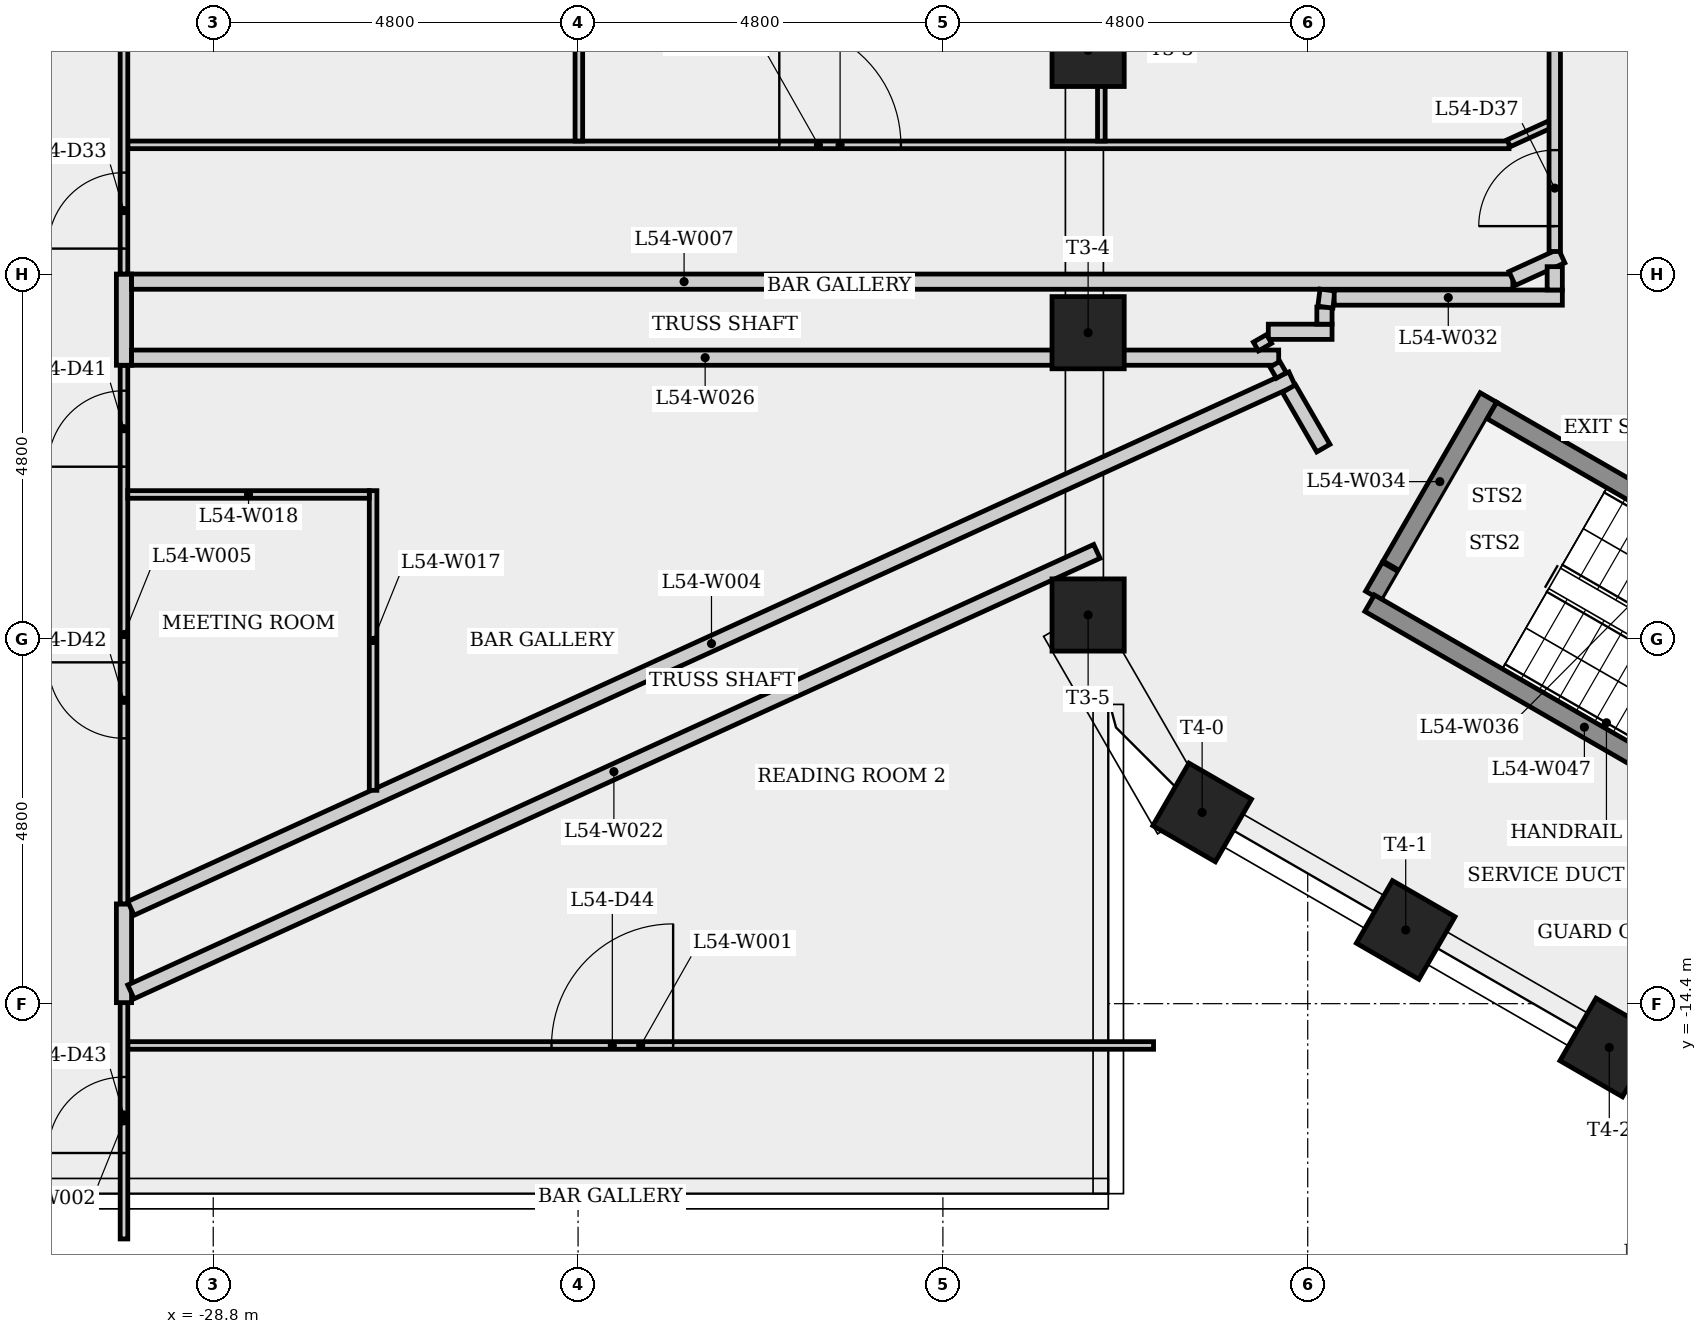
"""IFC4 building model, lengths in metres.
Left out: names, types, materials, properties, quantities, classifications, styles, units other than length and angle.
Written with IfcOpenShell. Run it as: python <this file> out.ifc"""

import sys

from ifc_helpers import new_model, si_unit, direction, frame, frame_2d, origin, origin_2d, place, context, subcontext, project, spatial, rectangle, extrude, element, fill, save


model = new_model("IFC4")
c1 = context("Model", 3, precision=1e-05, world=origin(), true_north=direction((0.0, 1.0)))
c2 = subcontext(c1, "Body", "Model", "MODEL_VIEW")
j1 = project(units=[si_unit("LENGTHUNIT", "METRE"), si_unit("PLANEANGLEUNIT", "RADIAN")], contexts=[c1])
p1 = place(None, origin())
s1 = spatial("IfcSite", under=j1, at=p1, CompositionType="ELEMENT")
p2 = place(p1, origin())
s2 = spatial("IfcBuilding", under=s1, at=p2, CompositionType="ELEMENT")
p3 = place(p2, frame((0.0, 0.0, 202.1)))
s3 = spatial("IfcBuildingStorey", under=s2, at=p3, CompositionType="ELEMENT", Elevation=202.1)
for number, where, z_axis, x_axis in (
    (1, (-17.289, -1.857, 0.0), (0.0, 0.0, 1.0), (-1.0, 0.0, 0.0)),
    (2, (-17.289, -5.572, 0.0), (0.0, 0.0, 1.0), (-1.0, 0.0, 0.0)),
    (3, (-17.289, -9.286, 0.0), (0.0, 0.0, 1.0), (-1.0, 0.0, 0.0)),
    (4, (-15.789, -11.884, 0.0), (0.0, 0.0, 1.0), (-0.5, -0.866, 0.0)),
    (5, (-13.111, -13.43, 0.0), (0.0, 0.0, 1.0), (-0.5, -0.866, 0.0)),
    (6, (-10.432, -14.977, 0.0), (0.0, 0.0, 1.0), (-0.5, -0.866, 0.0)),
):
    element("IfcColumn", number, at=place(p3, frame(where, z_axis=z_axis, x_axis=x_axis)), inside=s3, PredefinedType="COLUMN", context=c2, shape_type="SweptSolid", body=[
        extrude(rectangle(XDim=0.95, YDim=0.95, at=origin_2d()), origin(), (0.0, 0.0, 1.0), 4.0),
    ])
p4 = place(p3, frame((-29.924, -14.95, 0.0), z_axis=(0.0, 0.0, 1.0), x_axis=(1.0, 0.0, 0.0)))
e7 = element("IfcWall", 7, at=p4, inside=s3, PredefinedType="PARTITIONING", context=c2, shape_type="SweptSolid", body=[
    extrude(rectangle(XDim=13.496, YDim=0.1, at=frame_2d((6.748, 0.0))), origin(), (0.0, 0.0, 1.0), 3.6),
])
p5 = place(p4, frame((5.575, 0.0, 0.0)))
e8 = element("IfcOpeningElement", 8, at=p5, cuts=e7, PredefinedType="OPENING", context=c2, shape_type="SweptSolid", body=[
    extrude(rectangle(XDim=1.6, YDim=2.1, at=frame_2d((0.8, 1.05))), frame((0.0, 0.06, 0.0), z_axis=(0.0, -1.0, 0.0), x_axis=(1.0, 0.0, 0.0)), (0.0, 0.0, 1.0), 0.12),
])
p6 = place(p3, frame((-29.974, -17.496, 0.0), z_axis=(0.0, 0.0, 1.0), x_axis=(0.0, 1.0, 0.0)))
e9 = element("IfcWall", 9, at=p6, inside=s3, PredefinedType="PARTITIONING", context=c2, shape_type="SweptSolid", body=[
    extrude(rectangle(XDim=3.11, YDim=0.1, at=frame_2d((1.555, 0.0))), origin(), (0.0, 0.0, 1.0), 3.6),
])
p7 = place(p6, frame((1.131, 0.0, 0.0)))
e10 = element("IfcOpeningElement", 10, at=p7, cuts=e9, PredefinedType="OPENING", context=c2, shape_type="SweptSolid", body=[
    extrude(rectangle(XDim=1.0, YDim=2.1, at=frame_2d((0.5, 1.05))), frame((0.0, 0.06, 0.0), z_axis=(0.0, -1.0, 0.0), x_axis=(1.0, 0.0, 0.0)), (0.0, 0.0, 1.0), 0.12),
])
p8 = place(p3, frame((-29.974, -14.387, 0.0), z_axis=(0.0, 0.0, 1.0), x_axis=(0.0, 1.0, 0.0)))
e11 = element("IfcWall", 11, at=p8, inside=s3, PredefinedType="PLUMBINGWALL", context=c2, shape_type="SweptSolid", body=[
    extrude(rectangle(XDim=1.299, YDim=0.2, at=frame_2d((0.649, 0.0))), origin(), (0.0, 0.0, 1.0), 3.6),
])
p9 = place(p3, frame((-29.883, -13.146, 0.0), z_axis=(0.0, 0.0, 1.0), x_axis=(0.909854392912, 0.414927684903, 0.0)))
e12 = element("IfcWall", 12, at=p9, inside=s3, PredefinedType="PLUMBINGWALL", context=c2, shape_type="SweptSolid", body=[
    extrude(rectangle(XDim=16.791, YDim=0.2, at=frame_2d((8.396, 0.0))), origin(), (0.0, 0.0, 1.0), 3.6),
])
p10 = place(p3, frame((-29.974, -13.088, 0.0), z_axis=(0.0, 0.0, 1.0), x_axis=(0.0, 1.0, 0.0)))
e13 = element("IfcWall", 13, at=p10, inside=s3, PredefinedType="PARTITIONING", context=c2, shape_type="SweptSolid", body=[
    extrude(rectangle(XDim=7.088, YDim=0.1, at=frame_2d((3.544, 0.0))), origin(), (0.0, 0.0, 1.0), 3.6),
])
p11 = place(p10, frame((5.753, 0.0, 0.0)))
e14 = element("IfcOpeningElement", 14, at=p11, cuts=e13, PredefinedType="OPENING", context=c2, shape_type="SweptSolid", body=[
    extrude(rectangle(XDim=1.0, YDim=2.1, at=frame_2d((0.5, 1.05))), frame((0.0, 0.06, 0.0), z_axis=(0.0, -1.0, 0.0), x_axis=(1.0, 0.0, 0.0)), (0.0, 0.0, 1.0), 0.12),
])
p12 = place(p10, frame((2.179, 0.0, 0.0)))
e15 = element("IfcOpeningElement", 15, at=p12, cuts=e13, PredefinedType="OPENING", context=c2, shape_type="SweptSolid", body=[
    extrude(rectangle(XDim=1.0, YDim=2.1, at=frame_2d((0.5, 1.05))), frame((0.0, 0.06, 0.0), z_axis=(0.0, -1.0, 0.0), x_axis=(1.0, 0.0, 0.0)), (0.0, 0.0, 1.0), 0.12),
])
p13 = place(p3, frame((-29.974, -6.0, 0.0), z_axis=(0.0, 0.0, 1.0), x_axis=(0.0, 1.0, 0.0)))
e16 = element("IfcWall", 16, at=p13, inside=s3, PredefinedType="PLUMBINGWALL", context=c2, shape_type="SweptSolid", body=[
    extrude(rectangle(XDim=1.2, YDim=0.2, at=frame_2d((0.6, 0.0))), origin(), (0.0, 0.0, 1.0), 3.6),
])
p14 = place(p3, frame((-29.874, -4.9, 0.0), z_axis=(0.0, 0.0, 1.0), x_axis=(1.0, 0.0, 0.0)))
e17 = element("IfcWall", 17, at=p14, inside=s3, PredefinedType="PLUMBINGWALL", context=c2, shape_type="SweptSolid", body=[
    extrude(rectangle(XDim=18.173, YDim=0.2, at=frame_2d((9.086, 0.0))), origin(), (0.0, 0.0, 1.0), 3.6),
])
p15 = place(p3, frame((-29.924, -3.1, 0.0), z_axis=(0.0, 0.0, 1.0), x_axis=(1.0, 0.0, 0.0)))
e18 = element("IfcWall", 18, at=p15, inside=s3, PredefinedType="PARTITIONING", context=c2, shape_type="SweptSolid", body=[
    extrude(rectangle(XDim=18.173, YDim=0.1, at=frame_2d((9.086, 0.0))), origin(), (0.0, 0.0, 1.0), 3.6),
])
p16 = place(p15, frame((8.572, 0.0, 0.0)))
e19 = element("IfcOpeningElement", 19, at=p16, cuts=e18, PredefinedType="OPENING", context=c2, shape_type="SweptSolid", body=[
    extrude(rectangle(XDim=1.6, YDim=2.1, at=frame_2d((0.8, 1.05))), frame((0.0, 0.06, 0.0), z_axis=(0.0, -1.0, 0.0), x_axis=(1.0, 0.0, 0.0)), (0.0, 0.0, 1.0), 0.12),
])
p17 = place(p3, frame((-29.974, -4.8, 0.0), z_axis=(0.0, 0.0, 1.0), x_axis=(0.0, 1.0, 0.0)))
e20 = element("IfcWall", 20, at=p17, inside=s3, PredefinedType="PARTITIONING", context=c2, shape_type="SweptSolid", body=[
    extrude(rectangle(XDim=13.8, YDim=0.1, at=frame_2d((6.9, 0.0))), origin(), (0.0, 0.0, 1.0), 3.6),
])
p18 = place(p17, frame((0.335, 0.0, 0.0)))
e21 = element("IfcOpeningElement", 21, at=p18, cuts=e20, PredefinedType="OPENING", context=c2, shape_type="SweptSolid", body=[
    extrude(rectangle(XDim=1.0, YDim=2.1, at=frame_2d((0.5, 1.05))), frame((0.0, 0.06, 0.0), z_axis=(0.0, -1.0, 0.0), x_axis=(1.0, 0.0, 0.0)), (0.0, 0.0, 1.0), 0.12),
])
p19 = place(p17, frame((6.965, 0.0, 0.0)))
e22 = element("IfcOpeningElement", 22, at=p19, cuts=e20, PredefinedType="OPENING", context=c2, shape_type="SweptSolid", body=[
    extrude(rectangle(XDim=1.6, YDim=2.1, at=frame_2d((0.8, 1.05))), frame((0.0, 0.06, 0.0), z_axis=(0.0, -1.0, 0.0), x_axis=(1.0, 0.0, 0.0)), (0.0, 0.0, 1.0), 0.12),
])
p20 = place(p3, frame((-26.697, -11.593, 0.0), z_axis=(0.0, 0.0, 1.0), x_axis=(0.0, 1.0, 0.0)))
e23 = element("IfcWall", 23, at=p20, inside=s3, PredefinedType="PARTITIONING", context=c2, shape_type="SweptSolid", body=[
    extrude(rectangle(XDim=3.943, YDim=0.1, at=frame_2d((1.972, 0.0))), origin(), (0.0, 0.0, 1.0), 3.6),
])
p21 = place(p3, frame((-26.747, -7.7, 0.0), z_axis=(0.0, 0.0, 1.0), x_axis=(-1.0, 0.0, 0.0)))
e24 = element("IfcWall", 24, at=p21, inside=s3, PredefinedType="PARTITIONING", context=c2, shape_type="SweptSolid", body=[
    extrude(rectangle(XDim=3.177, YDim=0.1, at=frame_2d((1.589, 0.0))), origin(), (0.0, 0.0, 1.0), 3.6),
])
p22 = place(p3, frame((-23.99, -3.05, 0.0), z_axis=(0.0, 0.0, 1.0), x_axis=(0.0, 1.0, 0.0)))
e25 = element("IfcWall", 25, at=p22, inside=s3, PredefinedType="PARTITIONING", context=c2, shape_type="SweptSolid", body=[
    extrude(rectangle(XDim=12.05, YDim=0.1, at=frame_2d((6.025, 0.0))), origin(), (0.0, 0.0, 1.0), 3.6),
])
p23 = place(p3, frame((-17.174, -8.449, 0.0), z_axis=(0.0, 0.0, 1.0), x_axis=(-0.909851000848, -0.414935122947, 0.0)))
e26 = element("IfcWall", 26, at=p23, inside=s3, PredefinedType="PLUMBINGWALL", context=c2, shape_type="SweptSolid", body=[
    extrude(rectangle(XDim=13.968, YDim=0.2, at=frame_2d((6.984, 0.0))), origin(), (0.0, 0.0, 1.0), 3.6),
])
p24 = place(p3, frame((-17.115, -3.05, 0.0), z_axis=(0.0, 0.0, 1.0), x_axis=(0.0, 1.0, 0.0)))
e27 = element("IfcWall", 27, at=p24, inside=s3, PredefinedType="PARTITIONING", context=c2, shape_type="SweptSolid", body=[
    extrude(rectangle(XDim=12.05, YDim=0.1, at=frame_2d((6.025, 0.0))), origin(), (0.0, 0.0, 1.0), 2.775),
])
p25 = place(p3, frame((-14.918, -5.56, 0.0), z_axis=(0.0, 0.0, 1.0), x_axis=(1.0, 0.0, 0.0)))
e28 = element("IfcWall", 28, at=p25, inside=s3, PredefinedType="PLUMBINGWALL", context=c2, shape_type="SweptSolid", body=[
    extrude(rectangle(XDim=0.838, YDim=0.2, at=frame_2d((0.419, 0.0))), origin(), (0.0, 0.0, 1.0), 3.6),
])
p26 = place(p3, frame((-14.782, -5.9, 0.0), z_axis=(0.0, 0.0, 1.0), x_axis=(-1.0, 0.0, 0.0)))
e29 = element("IfcWall", 29, at=p26, inside=s3, PredefinedType="PLUMBINGWALL", context=c2, shape_type="SweptSolid", body=[
    extrude(rectangle(XDim=15.092, YDim=0.2, at=frame_2d((7.546, 0.0))), origin(), (0.0, 0.0, 1.0), 3.6),
])
p27 = place(p3, frame((-14.962, -5.761, 0.0), z_axis=(0.0, 0.0, 1.0), x_axis=(-0.499880961361, 0.866094119867, 0.0)))
e30 = element("IfcWall", 30, at=p27, inside=s3, PredefinedType="PLUMBINGWALL", context=c2, shape_type="SweptSolid", body=[
    extrude(rectangle(XDim=0.133, YDim=0.2, at=frame_2d((0.067, 0.0))), origin(), (0.0, 0.0, 1.0), 3.6),
])
p28 = place(p3, frame((-14.747, -6.134, 0.0), z_axis=(0.0, 0.0, 1.0), x_axis=(-0.499846793097, 0.866113839764, 0.0)))
e31 = element("IfcWall", 31, at=p28, inside=s3, PredefinedType="PARTITIONING", context=c2, shape_type="SweptSolid", body=[
    extrude(rectangle(XDim=0.17, YDim=0.15, at=frame_2d((0.085, 0.0))), origin(), (0.0, 0.0, 1.0), 3.6),
])
p29 = place(p3, frame((-14.195, -7.091, 0.0), z_axis=(0.0, 0.0, 1.0), x_axis=(-0.499940434119, 0.866059791431, 0.0)))
e32 = element("IfcWall", 32, at=p29, inside=s3, PredefinedType="PLUMBINGWALL", context=c2, shape_type="SweptSolid", body=[
    extrude(rectangle(XDim=0.905, YDim=0.2, at=frame_2d((0.452, 0.0))), origin(), (0.0, 0.0, 1.0), 3.6),
])
p30 = place(p3, frame((-14.18, -5.459, 0.0), z_axis=(0.0, 0.0, 1.0), x_axis=(0.0, 1.0, 0.0)))
e33 = element("IfcWall", 33, at=p30, inside=s3, PredefinedType="PLUMBINGWALL", context=c2, shape_type="SweptSolid", body=[
    extrude(rectangle(XDim=0.225, YDim=0.2, at=frame_2d((0.113, 0.0))), origin(), (0.0, 0.0, 1.0), 3.6),
])
p31 = place(p3, frame((-14.167, -5.235, 0.0), z_axis=(0.0, 0.0, 1.0), x_axis=(0.124962785906, 0.992161429475, 0.0)))
e34 = element("IfcWall", 34, at=p31, inside=s3, PredefinedType="PLUMBINGWALL", context=c2, shape_type="SweptSolid", body=[
    extrude(rectangle(XDim=0.227, YDim=0.2, at=frame_2d((0.113, 0.0))), origin(), (0.0, 0.0, 1.0), 3.6),
])
p32 = place(p3, frame((-14.052, -5.11, 0.0), z_axis=(0.0, 0.0, 1.0), x_axis=(1.0, 0.0, 0.0)))
e35 = element("IfcWall", 35, at=p32, inside=s3, PredefinedType="PLUMBINGWALL", context=c2, shape_type="SweptSolid", body=[
    extrude(rectangle(XDim=3.002, YDim=0.2, at=frame_2d((1.501, 0.0))), origin(), (0.0, 0.0, 1.0), 3.6),
])
p33 = place(p3, frame((-13.531, -9.035, 0.0), z_axis=(0.0, 0.0, 1.0), x_axis=(0.500268326746, 0.86587042983, 0.0)))
e36 = element("IfcWall", 36, at=p33, inside=s3, PredefinedType="SHEAR", context=c2, shape_type="SweptSolid", body=[
    extrude(rectangle(XDim=0.439, YDim=0.25, at=frame_2d((0.219, 0.0))), origin(), (0.0, 0.0, 1.0), 3.6),
])
p34 = place(p3, frame((-13.301, -8.638, 0.0), z_axis=(0.0, 0.0, 1.0), x_axis=(0.499970471295, 0.866042451519, 0.0)))
e37 = element("IfcWall", 37, at=p34, inside=s3, PredefinedType="SHEAR", context=c2, shape_type="SweptSolid", body=[
    extrude(rectangle(XDim=2.556, YDim=0.25, at=frame_2d((1.278, 0.0))), origin(), (0.0, 0.0, 1.0), 3.6),
])
p35 = place(p3, frame((-11.977, -6.595, 0.0), z_axis=(0.0, 0.0, 1.0), x_axis=(0.866025499775, -0.499999833739, 0.0)))
e38 = element("IfcWall", 38, at=p35, inside=s3, PredefinedType="SHEAR", context=c2, shape_type="SweptSolid", body=[
    extrude(rectangle(XDim=6.4, YDim=0.25, at=frame_2d((3.2, 0.0))), origin(), (0.0, 0.0, 1.0), 3.6),
])
p36 = place(p35, frame((5.025, 0.0, 0.0)))
e39 = element("IfcOpeningElement", 39, at=p36, cuts=e38, PredefinedType="OPENING", context=c2, shape_type="SweptSolid", body=[
    extrude(rectangle(XDim=1.0, YDim=2.1, at=frame_2d((0.5, 1.05))), frame((0.0, 0.135, 0.0), z_axis=(0.0, -1.0, 0.0), x_axis=(1.0, 0.0, 0.0)), (0.0, 0.0, 1.0), 0.27),
])
p37 = place(p3, frame((-11.71, -4.858, 0.0), z_axis=(0.0, 0.0, 1.0), x_axis=(0.909816789355, 0.415010132176, 0.0)))
e40 = element("IfcWall", 40, at=p37, inside=s3, PredefinedType="PLUMBINGWALL", context=c2, shape_type="SweptSolid", body=[
    extrude(rectangle(XDim=0.716, YDim=0.2, at=frame_2d((0.358, 0.0))), origin(), (0.0, 0.0, 1.0), 3.6),
])
p38 = place(p3, frame((-11.756, -3.079, 0.0), z_axis=(0.0, 0.0, 1.0), x_axis=(0.909728715425, 0.41520316031, 0.0)))
e41 = element("IfcWall", 41, at=p38, inside=s3, PredefinedType="PARTITIONING", context=c2, shape_type="SweptSolid", body=[
    extrude(rectangle(XDim=0.591, YDim=0.1, at=frame_2d((0.295, 0.0))), origin(), (0.0, 0.0, 1.0), 3.6),
])
p39 = place(p3, frame((-11.15, -5.01, 0.0), z_axis=(0.0, 0.0, 1.0), x_axis=(0.0, 1.0, 0.0)))
e42 = element("IfcWall", 42, at=p39, inside=s3, PredefinedType="PLUMBINGWALL", context=c2, shape_type="SweptSolid", body=[
    extrude(rectangle(XDim=0.307, YDim=0.2, at=frame_2d((0.153, 0.0))), origin(), (0.0, 0.0, 1.0), 3.6),
])
p40 = place(p3, frame((-11.15, -4.503, 0.0), z_axis=(0.0, 0.0, 1.0), x_axis=(0.0, 1.0, 0.0)))
e43 = element("IfcWall", 43, at=p40, inside=s3, PredefinedType="PARTITIONING", context=c2, shape_type="SweptSolid", body=[
    extrude(rectangle(XDim=9.988, YDim=0.15, at=frame_2d((4.994, 0.0))), origin(), (0.0, 0.0, 1.0), 3.6),
])
p41 = place(p40, frame((0.333, 0.0, 0.0)))
e44 = element("IfcOpeningElement", 44, at=p41, cuts=e43, PredefinedType="OPENING", context=c2, shape_type="SweptSolid", body=[
    extrude(rectangle(XDim=1.0, YDim=2.1, at=frame_2d((0.5, 1.05))), frame((0.0, 0.085, 0.0), z_axis=(0.0, -1.0, 0.0), x_axis=(1.0, 0.0, 0.0)), (0.0, 0.0, 1.0), 0.17),
])
p42 = place(p40, frame((5.059, 0.0, 0.0)))
e45 = element("IfcOpeningElement", 45, at=p42, cuts=e43, PredefinedType="OPENING", context=c2, shape_type="SweptSolid", body=[
    extrude(rectangle(XDim=1.6, YDim=2.1, at=frame_2d((0.8, 1.05))), frame((0.0, 0.085, 0.0), z_axis=(0.0, -1.0, 0.0), x_axis=(1.0, 0.0, 0.0)), (0.0, 0.0, 1.0), 0.17),
])
p43 = place(p3, frame((-7.935, -12.393, 0.0), z_axis=(0.0, 0.0, 1.0), x_axis=(-0.866031063448, 0.499990197047, 0.0)))
e46 = element("IfcWall", 46, at=p43, inside=s3, PredefinedType="SHEAR", context=c2, shape_type="SweptSolid", body=[
    extrude(rectangle(XDim=6.525, YDim=0.25, at=frame_2d((3.263, 0.0))), origin(), (0.0, 0.0, 1.0), 3.6),
])
p44 = place(p18, origin())
e47 = element("IfcDoor", 47, at=p44, inside=s3, OperationType="SINGLE_SWING_LEFT", PredefinedType="DOOR", context=c2, shape_type="SweptSolid", body=[
    extrude(rectangle(XDim=1.0, YDim=2.1, at=frame_2d((0.5, 1.05))), frame((0.0, 0.025, 0.0), z_axis=(0.0, -1.0, 0.0), x_axis=(1.0, 0.0, 0.0)), (0.0, 0.0, 1.0), 0.05),
])
fill(e21, e47)
p45 = place(p41, origin())
e48 = element("IfcDoor", 48, at=p45, inside=s3, OperationType="SINGLE_SWING_LEFT", PredefinedType="DOOR", context=c2, shape_type="SweptSolid", body=[
    extrude(rectangle(XDim=1.0, YDim=2.1, at=frame_2d((0.5, 1.05))), frame((0.0, 0.025, 0.0), z_axis=(0.0, -1.0, 0.0), x_axis=(1.0, 0.0, 0.0)), (0.0, 0.0, 1.0), 0.05),
])
fill(e44, e48)
p46 = place(p16, origin())
e49 = element("IfcDoor", 49, at=p46, inside=s3, OperationType="SINGLE_SWING_LEFT", PredefinedType="DOOR", context=c2, shape_type="SweptSolid", body=[
    extrude(rectangle(XDim=1.6, YDim=2.1, at=frame_2d((0.8, 1.05))), frame((0.0, 0.025, 0.0), z_axis=(0.0, -1.0, 0.0), x_axis=(1.0, 0.0, 0.0)), (0.0, 0.0, 1.0), 0.05),
])
fill(e19, e49)
p47 = place(p11, origin())
e50 = element("IfcDoor", 50, at=p47, inside=s3, OperationType="SINGLE_SWING_LEFT", PredefinedType="DOOR", context=c2, shape_type="SweptSolid", body=[
    extrude(rectangle(XDim=1.0, YDim=2.1, at=frame_2d((0.5, 1.05))), frame((0.0, 0.025, 0.0), z_axis=(0.0, -1.0, 0.0), x_axis=(1.0, 0.0, 0.0)), (0.0, 0.0, 1.0), 0.05),
])
fill(e14, e50)
p48 = place(p12, origin())
e51 = element("IfcDoor", 51, at=p48, inside=s3, OperationType="SINGLE_SWING_RIGHT", PredefinedType="DOOR", context=c2, shape_type="SweptSolid", body=[
    extrude(rectangle(XDim=1.0, YDim=2.1, at=frame_2d((0.5, 1.05))), frame((0.0, 0.025, 0.0), z_axis=(0.0, -1.0, 0.0), x_axis=(1.0, 0.0, 0.0)), (0.0, 0.0, 1.0), 0.05),
])
fill(e15, e51)
p49 = place(p7, origin())
e52 = element("IfcDoor", 52, at=p49, inside=s3, OperationType="SINGLE_SWING_LEFT", PredefinedType="DOOR", context=c2, shape_type="SweptSolid", body=[
    extrude(rectangle(XDim=1.0, YDim=2.1, at=frame_2d((0.5, 1.05))), frame((0.0, 0.025, 0.0), z_axis=(0.0, -1.0, 0.0), x_axis=(1.0, 0.0, 0.0)), (0.0, 0.0, 1.0), 0.05),
])
fill(e10, e52)
p50 = place(p5, origin())
e53 = element("IfcDoor", 53, at=p50, inside=s3, OperationType="SINGLE_SWING_RIGHT", PredefinedType="DOOR", context=c2, shape_type="SweptSolid", body=[
    extrude(rectangle(XDim=1.6, YDim=2.1, at=frame_2d((0.8, 1.05))), frame((0.0, 0.025, 0.0), z_axis=(0.0, -1.0, 0.0), x_axis=(1.0, 0.0, 0.0)), (0.0, 0.0, 1.0), 0.05),
])
fill(e8, e53)
save(model, sys.argv[1])
